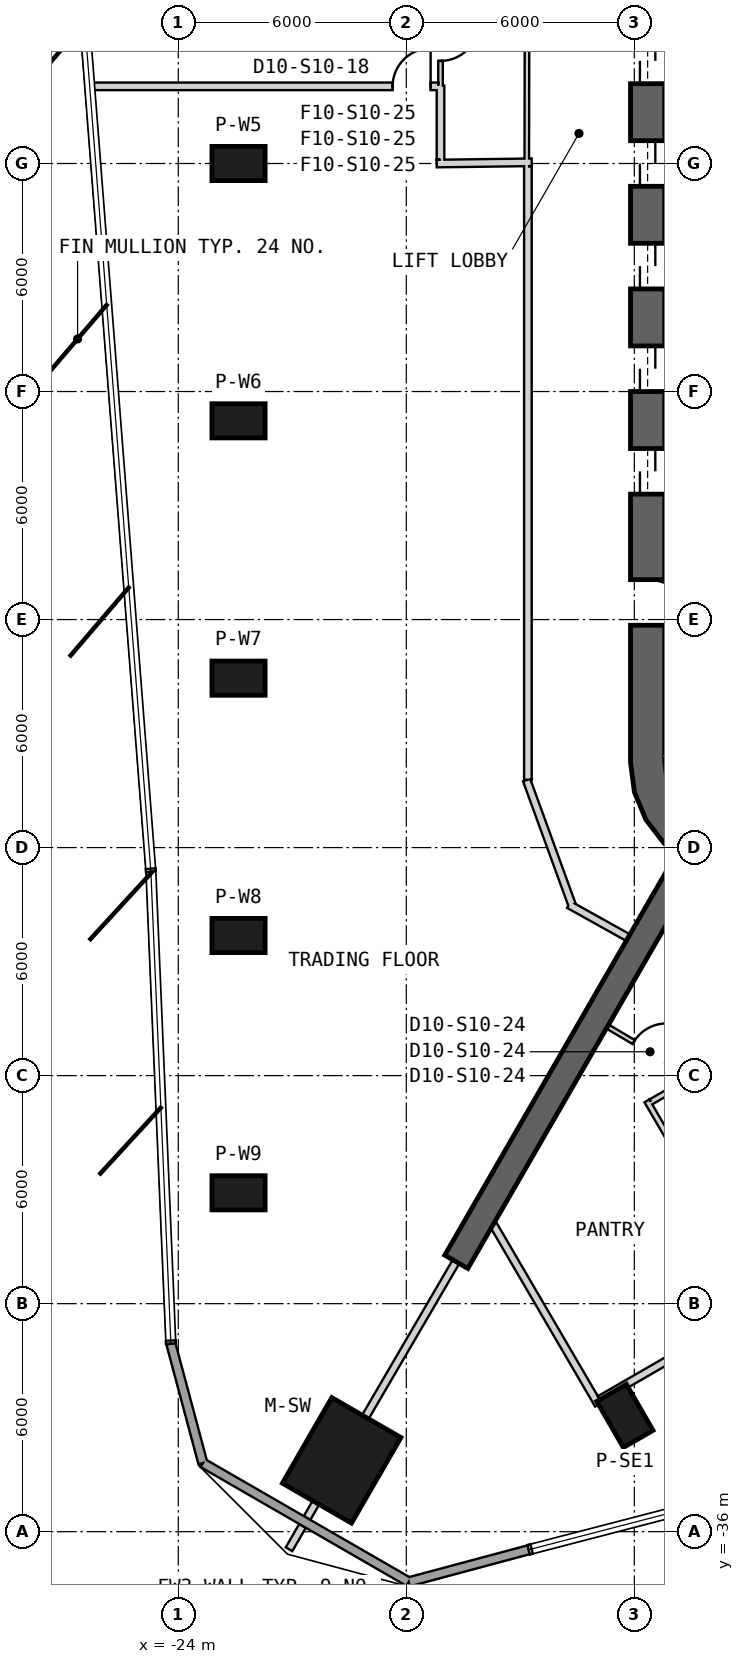
"""IFC4 building model, lengths in metres.
Left out: names, types, materials, properties, quantities, classifications, styles, units other than length and angle.
Written with IfcOpenShell. Run it as: python <this file> out.ifc"""

import sys

from ifc_helpers import new_model, si_unit, direction, frame, frame_2d, origin, origin_2d, place, context, subcontext, project, spatial, polyline, rectangle, outline, extrude, element, fill, save


model = new_model("IFC4")
c1 = context("Model", 3, precision=1e-05, world=origin(), true_north=direction((0.0, 1.0)))
c2 = subcontext(c1, "Body", "Model", "MODEL_VIEW")
j1 = project(units=[si_unit("LENGTHUNIT", "METRE"), si_unit("PLANEANGLEUNIT", "RADIAN")], contexts=[c1])
p1 = place(None, origin())
s1 = spatial("IfcSite", under=j1, at=p1, CompositionType="ELEMENT")
p2 = place(p1, origin())
s2 = spatial("IfcBuilding", under=s1, at=p2, CompositionType="ELEMENT")
p3 = place(p2, frame((0.0, 0.0, 181.2)))
s3 = spatial("IfcBuildingStorey", under=s2, at=p3, CompositionType="ELEMENT", Elevation=181.2)
p4 = place(p3, frame((-19.701, -34.124, 0.0), z_axis=(0.0, 0.0, 1.0), x_axis=(-0.5, -0.866025403784, 0.0)))
e1 = element("IfcColumn", 1, at=p4, inside=s3, PredefinedType="COLUMN", context=c2, shape_type="SweptSolid", body=[
    extrude(rectangle(XDim=2.6, YDim=2.1, at=origin_2d()), origin(), (0.0, 0.0, 1.0), 4.0),
])
for number, where, z_axis, x_axis in (
    (2, (-22.415, 0.0, 0.0), (0.0, 0.0, 1.0), (-1.0, 0.0, 0.0)),
    (3, (-22.415, -6.771, 0.0), (0.0, 0.0, 1.0), (-1.0, 0.0, 0.0)),
    (4, (-22.415, -13.542, 0.0), (0.0, 0.0, 1.0), (-1.0, 0.0, 0.0)),
    (5, (-22.415, -20.313, 0.0), (0.0, 0.0, 1.0), (-1.0, 0.0, 0.0)),
    (6, (-22.415, -27.084, 0.0), (0.0, 0.0, 1.0), (-1.0, 0.0, 0.0)),
    (7, (-12.248, -32.954, 0.0), (0.0, 0.0, 1.0), (0.5, -0.866, 0.0)),
):
    element("IfcColumn", number, at=place(p3, frame(where, z_axis=z_axis, x_axis=x_axis)), inside=s3, PredefinedType="COLUMN", context=c2, shape_type="SweptSolid", body=[
        extrude(rectangle(XDim=1.4, YDim=0.9, at=origin_2d()), origin(), (0.0, 0.0, 1.0), 4.0),
    ])
p5 = place(p3, frame((-11.65, 15.762, 0.0), z_axis=(0.0, 0.0, 1.0), x_axis=(0.0, -1.0, 0.0)))
e8 = element("IfcWall", 8, at=p5, inside=s3, PredefinedType="SHEAR", context=c2, shape_type="SweptSolid", body=[
    extrude(rectangle(XDim=31.523, YDim=0.9, at=frame_2d((15.762, 0.0))), origin(), (0.0, 0.0, 1.0), 4.0),
])
p6 = place(p5, frame((7.062, 0.0, 0.0)))
e9 = element("IfcOpeningElement", 9, at=p6, cuts=e8, PredefinedType="OPENING", context=c2, shape_type="SweptSolid", body=[
    extrude(rectangle(XDim=1.2, YDim=2.4, at=frame_2d((0.6, 1.2))), frame((0.0, 0.46, 0.0), z_axis=(0.0, -1.0, 0.0), x_axis=(1.0, 0.0, 0.0)), (0.0, 0.0, 1.0), 0.92),
])
p7 = place(p5, frame((9.762, 0.0, 0.0)))
e10 = element("IfcOpeningElement", 10, at=p7, cuts=e8, PredefinedType="OPENING", context=c2, shape_type="SweptSolid", body=[
    extrude(rectangle(XDim=1.2, YDim=2.4, at=frame_2d((0.6, 1.2))), frame((0.0, 0.46, 0.0), z_axis=(0.0, -1.0, 0.0), x_axis=(1.0, 0.0, 0.0)), (0.0, 0.0, 1.0), 0.92),
])
p8 = place(p5, frame((12.462, 0.0, 0.0)))
e11 = element("IfcOpeningElement", 11, at=p8, cuts=e8, PredefinedType="OPENING", context=c2, shape_type="SweptSolid", body=[
    extrude(rectangle(XDim=1.2, YDim=2.4, at=frame_2d((0.6, 1.2))), frame((0.0, 0.46, 0.0), z_axis=(0.0, -1.0, 0.0), x_axis=(1.0, 0.0, 0.0)), (0.0, 0.0, 1.0), 0.92),
])
p9 = place(p5, frame((15.162, 0.0, 0.0)))
e12 = element("IfcOpeningElement", 12, at=p9, cuts=e8, PredefinedType="OPENING", context=c2, shape_type="SweptSolid", body=[
    extrude(rectangle(XDim=1.2, YDim=2.4, at=frame_2d((0.6, 1.2))), frame((0.0, 0.46, 0.0), z_axis=(0.0, -1.0, 0.0), x_axis=(1.0, 0.0, 0.0)), (0.0, 0.0, 1.0), 0.92),
])
p10 = place(p5, frame((17.862, 0.0, 0.0)))
e13 = element("IfcOpeningElement", 13, at=p10, cuts=e8, PredefinedType="OPENING", context=c2, shape_type="SweptSolid", body=[
    extrude(rectangle(XDim=1.2, YDim=2.4, at=frame_2d((0.6, 1.2))), frame((0.0, 0.46, 0.0), z_axis=(0.0, -1.0, 0.0), x_axis=(1.0, 0.0, 0.0)), (0.0, 0.0, 1.0), 0.92),
])
p11 = place(p5, frame((20.562, 0.0, 0.0)))
e14 = element("IfcOpeningElement", 14, at=p11, cuts=e8, PredefinedType="OPENING", context=c2, shape_type="SweptSolid", body=[
    extrude(rectangle(XDim=1.2, YDim=2.4, at=frame_2d((0.6, 1.2))), frame((0.0, 0.46, 0.0), z_axis=(0.0, -1.0, 0.0), x_axis=(1.0, 0.0, 0.0)), (0.0, 0.0, 1.0), 0.92),
])
p12 = place(p5, frame((23.262, 0.0, 0.0)))
e15 = element("IfcOpeningElement", 15, at=p12, cuts=e8, PredefinedType="OPENING", context=c2, shape_type="SweptSolid", body=[
    extrude(rectangle(XDim=1.2, YDim=2.4, at=frame_2d((0.6, 1.2))), frame((0.0, 0.46, 0.0), z_axis=(0.0, -1.0, 0.0), x_axis=(1.0, 0.0, 0.0)), (0.0, 0.0, 1.0), 0.92),
])
p13 = place(p5, frame((3.612, 0.0, 0.0)))
e16 = element("IfcOpeningElement", 16, at=p13, cuts=e8, PredefinedType="OPENING", context=c2, shape_type="SweptSolid", body=[
    extrude(rectangle(XDim=1.2, YDim=2.4, at=frame_2d((0.6, 1.2))), frame((0.0, 0.46, 0.0), z_axis=(0.0, -1.0, 0.0), x_axis=(1.0, 0.0, 0.0)), (0.0, 0.0, 1.0), 0.92),
])
p14 = place(p5, frame((26.712, 0.0, 0.0)))
e17 = element("IfcOpeningElement", 17, at=p14, cuts=e8, PredefinedType="OPENING", context=c2, shape_type="SweptSolid", body=[
    extrude(rectangle(XDim=1.2, YDim=2.4, at=frame_2d((0.6, 1.2))), frame((0.0, 0.46, 0.0), z_axis=(0.0, -1.0, 0.0), x_axis=(1.0, 0.0, 0.0)), (0.0, 0.0, 1.0), 0.92),
])
p15 = place(p3, origin())
e18 = element("IfcWall", 18, at=p15, inside=s3, PredefinedType="SHEAR", context=c2, shape_type="SweptSolid", body=[
    extrude(outline(polyline([(-12.1, -15.762), (-11.998, -16.538), (-11.698, -17.262), (-11.221, -17.883), (-10.6, -18.36), (-9.876, -18.659), (-9.1, -18.762), (-8.323, -18.659), (-7.6, -18.36), (-8.05, -17.58), (-8.556, -17.79), (-9.1, -17.862), (-9.644, -17.79), (-10.15, -17.58), (-10.585, -17.247), (-10.919, -16.812), (-11.128, -16.305), (-11.2, -15.762), (-12.1, -15.762)])), origin(), (0.0, 0.0, 1.0), 4.0),
])
p16 = place(p3, frame((-10.575, -18.316, 0.0), z_axis=(0.0, 0.0, 1.0), x_axis=(-0.500002625756, -0.866023887798, 0.0)))
e19 = element("IfcWall", 19, at=p16, inside=s3, PredefinedType="SHEAR", context=c2, shape_type="SweptSolid", body=[
    extrude(rectangle(XDim=12.22, YDim=0.7, at=frame_2d((6.11, 0.0))), origin(), (0.0, 0.0, 1.0), 4.0),
])
p17 = place(p3, frame((-24.195, -31.051, 0.0), z_axis=(0.0, 0.0, 1.0), x_axis=(0.258806058597, -0.965929305919, 0.0)))
e20 = element("IfcWall", 20, at=p17, inside=s3, PredefinedType="SOLIDWALL", context=c2, shape_type="SweptSolid", body=[
    extrude(rectangle(XDim=3.255, YDim=0.24, at=frame_2d((1.628, 0.0))), origin(), (0.0, 0.0, 1.0), 3.7),
])
p18 = place(p3, frame((-23.353, -34.195, 0.0), z_axis=(0.0, 0.0, 1.0), x_axis=(0.866019130722, -0.500010865105, 0.0)))
e21 = element("IfcWall", 21, at=p18, inside=s3, PredefinedType="SOLIDWALL", context=c2, shape_type="SweptSolid", body=[
    extrude(rectangle(XDim=6.253, YDim=0.24, at=frame_2d((3.126, 0.0))), origin(), (0.0, 0.0, 1.0), 3.7),
])
p19 = place(p3, frame((-17.938, -37.322, 0.0), z_axis=(0.0, 0.0, 1.0), x_axis=(0.965924385118, 0.258824423565, 0.0)))
e22 = element("IfcWall", 22, at=p19, inside=s3, PredefinedType="SOLIDWALL", context=c2, shape_type="SweptSolid", body=[
    extrude(rectangle(XDim=3.269, YDim=0.24, at=frame_2d((1.635, 0.0))), origin(), (0.0, 0.0, 1.0), 3.7),
])
p20 = place(p3, frame((-11.282, -15.541, -0.3), z_axis=(0.0, 0.0, 1.0), x_axis=(0.866000483506, -0.500043160704, 0.0)))
e23 = element("IfcWall", 23, at=p20, inside=s3, PredefinedType="SHEAR", context=c2, shape_type="SweptSolid", body=[
    extrude(rectangle(XDim=3.8, YDim=0.2, at=frame_2d((1.9, 0.0))), origin(), (0.0, 0.0, 1.0), 4.0),
])
p21 = place(p3, frame((-7.196, -8.663, -0.3), z_axis=(0.0, 0.0, 1.0), x_axis=(-0.499997992926, -0.866026562566, 0.0)))
e24 = element("IfcWall", 24, at=p21, inside=s3, PredefinedType="SHEAR", context=c2, shape_type="SweptSolid", body=[
    extrude(rectangle(XDim=7.9, YDim=0.2, at=frame_2d((3.95, 0.0))), origin(), (0.0, 0.0, 1.0), 4.0),
])
p22 = place(p3, frame((-14.8, 16.257, 0.0), z_axis=(0.0, 0.0, 1.0), x_axis=(-0.001847148781, -0.999998294019, 0.0)))
e25 = element("IfcWall", 25, at=p22, inside=s3, PredefinedType="PARTITIONING", context=c2, shape_type="SweptSolid", body=[
    extrude(rectangle(XDim=16.257, YDim=0.12, at=frame_2d((8.128, 0.0))), origin(), (0.0, 0.0, 1.0), 2.88),
])
p23 = place(p22, frame((7.629, 0.0, 0.0)))
e26 = element("IfcOpeningElement", 26, at=p23, cuts=e25, PredefinedType="OPENING", context=c2, shape_type="SweptSolid", body=[
    extrude(rectangle(XDim=1.0, YDim=2.1, at=frame_2d((0.5, 1.05))), frame((0.0, 0.07, 0.0), z_axis=(0.0, -1.0, 0.0), x_axis=(1.0, 0.0, 0.0)), (0.0, 0.0, 1.0), 0.14),
])
p24 = place(p3, frame((-17.1, 4.35, 0.0), z_axis=(0.0, 0.0, 1.0), x_axis=(0.0, -1.0, 0.0)))
e27 = element("IfcWall", 27, at=p24, inside=s3, PredefinedType="PARTITIONING", context=c2, shape_type="SweptSolid", body=[
    extrude(rectangle(XDim=2.3, YDim=0.12, at=frame_2d((1.15, 0.0))), origin(), (0.0, 0.0, 1.0), 3.7),
])
p25 = place(p24, frame((0.65, 0.0, 0.0)))
e28 = element("IfcOpeningElement", 28, at=p25, cuts=e27, PredefinedType="OPENING", context=c2, shape_type="SweptSolid", body=[
    extrude(rectangle(XDim=1.0, YDim=2.1, at=frame_2d((0.5, 1.05))), frame((0.0, 0.07, 0.0), z_axis=(0.0, -1.0, 0.0), x_axis=(1.0, 0.0, 0.0)), (0.0, 0.0, 1.0), 0.14),
])
p26 = place(p3, frame((-17.2, -0.001, 0.0), z_axis=(0.0, 0.0, 1.0), x_axis=(0.999915662945, 0.012987185857, 0.0)))
e29 = element("IfcWall", 29, at=p26, inside=s3, PredefinedType="PARTITIONING", context=c2, shape_type="SweptSolid", body=[
    extrude(rectangle(XDim=2.5, YDim=0.2, at=frame_2d((1.25, 0.0))), origin(), (0.0, 0.0, 1.0), 3.07),
])
p27 = place(p3, frame((-17.1, 2.05, 0.0), z_axis=(0.0, 0.0, 1.0), x_axis=(0.0, -1.0, 0.0)))
e30 = element("IfcWall", 30, at=p27, inside=s3, PredefinedType="PARTITIONING", context=c2, shape_type="SweptSolid", body=[
    extrude(rectangle(XDim=1.95, YDim=0.2, at=frame_2d((0.975, 0.0))), origin(), (0.0, 0.0, 1.0), 3.07),
])
p28 = place(p3, frame((-13.722, -19.499, 0.0), z_axis=(0.0, 0.0, 1.0), x_axis=(0.873381780332, -0.487036205824, 0.0)))
e31 = element("IfcWall", 31, at=p28, inside=s3, PredefinedType="PARTITIONING", context=c2, shape_type="SweptSolid", body=[
    extrude(rectangle(XDim=1.785, YDim=0.2, at=frame_2d((0.892, 0.0))), origin(), (0.0, 0.0, 1.0), 3.7),
])
p29 = place(p3, frame((-14.834, -16.223, 0.0), z_axis=(0.0, 0.0, 1.0), x_axis=(0.342017717312, -0.939693503779, 0.0)))
e32 = element("IfcWall", 32, at=p29, inside=s3, PredefinedType="PARTITIONING", context=c2, shape_type="SweptSolid", body=[
    extrude(rectangle(XDim=3.497, YDim=0.2, at=frame_2d((1.749, 0.0))), origin(), (0.0, 0.0, 1.0), 2.78),
])
p30 = place(p3, frame((-14.8, -0.07, 0.0), z_axis=(0.0, 0.0, 1.0), x_axis=(0.0, -1.0, 0.0)))
e33 = element("IfcWall", 33, at=p30, inside=s3, PredefinedType="PARTITIONING", context=c2, shape_type="SweptSolid", body=[
    extrude(rectangle(XDim=16.147, YDim=0.2, at=frame_2d((8.073, 0.0))), origin(), (0.0, 0.0, 1.0), 2.88),
])
p31 = place(p3, frame((-12.707, -22.709, 0.0), z_axis=(0.0, 0.0, 1.0), x_axis=(0.860742216303, -0.509041095663, 0.0)))
e34 = element("IfcWall", 34, at=p31, inside=s3, PredefinedType="PARTITIONING", context=c2, shape_type="SweptSolid", body=[
    extrude(rectangle(XDim=2.506, YDim=0.12, at=frame_2d((1.253, 0.0))), origin(), (0.0, 0.0, 1.0), 3.7),
])
p32 = place(p31, frame((0.803, 0.0, 0.0)))
e35 = element("IfcOpeningElement", 35, at=p32, cuts=e34, PredefinedType="OPENING", context=c2, shape_type="SweptSolid", body=[
    extrude(rectangle(XDim=1.0, YDim=2.1, at=frame_2d((0.5, 1.05))), frame((0.0, 0.07, 0.0), z_axis=(0.0, -1.0, 0.0), x_axis=(1.0, 0.0, 0.0)), (0.0, 0.0, 1.0), 0.14),
])
p33 = place(p3, frame((-26.332, 2.03, 0.0), z_axis=(0.0, 0.0, 1.0), x_axis=(0.999999999646, 2.6619107e-05, 0.0)))
e36 = element("IfcWall", 36, at=p33, inside=s3, PredefinedType="PARTITIONING", context=c2, shape_type="SweptSolid", body=[
    extrude(rectangle(XDim=9.172, YDim=0.2, at=frame_2d((4.586, 0.0))), origin(), (0.0, 0.0, 1.0), 3.7),
])
p34 = place(p33, frame((7.972, 0.0, 0.0)))
e37 = element("IfcOpeningElement", 37, at=p34, cuts=e36, PredefinedType="OPENING", context=c2, shape_type="SweptSolid", body=[
    extrude(rectangle(XDim=1.0, YDim=2.1, at=frame_2d((0.5, 1.05))), frame((0.0, 0.11, 0.0), z_axis=(0.0, -1.0, 0.0), x_axis=(1.0, 0.0, 0.0)), (0.0, 0.0, 1.0), 0.22),
])
p35 = place(p3, frame((-21.086, -36.462, 0.0), z_axis=(0.0, 0.0, 1.0), x_axis=(0.499801860585, 0.866139769411, 0.0)))
e38 = element("IfcWall", 38, at=p35, inside=s3, PredefinedType="PARTITIONING", context=c2, shape_type="SweptSolid", body=[
    extrude(rectangle(XDim=0.71, YDim=0.2, at=frame_2d((0.355, 0.0))), origin(), (0.0, 0.0, 1.0), 3.7),
])
p36 = place(p3, frame((-20.611, -35.64, 0.0), z_axis=(0.0, 0.0, 1.0), x_axis=(0.499842898591, 0.866116087328, 0.0)))
e39 = element("IfcWall", 39, at=p36, inside=s3, PredefinedType="PARTITIONING", context=c2, shape_type="SweptSolid", body=[
    extrude(rectangle(XDim=0.468, YDim=0.2, at=frame_2d((0.234, 0.0))), origin(), (0.0, 0.0, 1.0), 3.7),
])
p37 = place(p3, frame((-19.077, -32.983, 0.0), z_axis=(0.0, 0.0, 1.0), x_axis=(0.504095526605, 0.863647902827, 0.0)))
e40 = element("IfcWall", 40, at=p37, inside=s3, PredefinedType="PARTITIONING", context=c2, shape_type="SweptSolid", body=[
    extrude(rectangle(XDim=4.733, YDim=0.2, at=frame_2d((2.366, 0.0))), origin(), (0.0, 0.0, 1.0), 3.27),
])
p38 = place(p3, frame((-8.543, -30.001, 0.0), z_axis=(0.0, 0.0, 1.0), x_axis=(-0.866017018378, -0.500014523669, 0.0)))
e41 = element("IfcWall", 41, at=p38, inside=s3, PredefinedType="PARTITIONING", context=c2, shape_type="SweptSolid", body=[
    extrude(rectangle(XDim=5.041, YDim=0.2, at=frame_2d((2.521, 0.0))), origin(), (0.0, 0.0, 1.0), 2.78),
])
p39 = place(p3, frame((-15.714, -27.918, 0.0), z_axis=(0.0, 0.0, 1.0), x_axis=(0.504506882404, -0.863407670574, 0.0)))
e42 = element("IfcWall", 42, at=p39, inside=s3, PredefinedType="PARTITIONING", context=c2, shape_type="SweptSolid", body=[
    extrude(rectangle(XDim=5.49, YDim=0.2, at=frame_2d((2.745, 0.0))), origin(), (0.0, 0.0, 1.0), 3.7),
])
p40 = place(p3, frame((-8.588, -29.94, 0.0), z_axis=(0.0, 0.0, 1.0), x_axis=(-0.504258537923, 0.863552735467, 0.0)))
e43 = element("IfcWall", 43, at=p40, inside=s3, PredefinedType="PLUMBINGWALL", context=c2, shape_type="SweptSolid", body=[
    extrude(rectangle(XDim=6.11, YDim=0.15, at=frame_2d((3.055, 0.0))), origin(), (0.0, 0.0, 1.0), 2.78),
])
p41 = place(p3, frame((-10.331, -23.984, 0.0), z_axis=(0.0, 0.0, 1.0), x_axis=(-0.867587682712, -0.49728423744, 0.0)))
e44 = element("IfcWall", 44, at=p41, inside=s3, PredefinedType="PLUMBINGWALL", context=c2, shape_type="SweptSolid", body=[
    extrude(rectangle(XDim=1.423, YDim=0.15, at=frame_2d((0.711, 0.0))), origin(), (0.0, 0.0, 1.0), 3.7),
])
p42 = place(p25, origin())
e45 = element("IfcDoor", 45, at=p42, inside=s3, OperationType="SINGLE_SWING_RIGHT", PredefinedType="NOTDEFINED", context=c2, shape_type="SweptSolid", body=[
    extrude(rectangle(XDim=1.0, YDim=2.1, at=frame_2d((0.5, 1.05))), frame((0.0, 0.025, 0.0), z_axis=(0.0, -1.0, 0.0), x_axis=(1.0, 0.0, 0.0)), (0.0, 0.0, 1.0), 0.05),
])
fill(e28, e45)
p43 = place(p32, origin())
e46 = element("IfcDoor", 46, at=p43, inside=s3, OperationType="SINGLE_SWING_RIGHT", PredefinedType="NOTDEFINED", context=c2, shape_type="SweptSolid", body=[
    extrude(rectangle(XDim=1.0, YDim=2.1, at=frame_2d((0.5, 1.05))), frame((0.0, 0.025, 0.0), z_axis=(0.0, -1.0, 0.0), x_axis=(1.0, 0.0, 0.0)), (0.0, 0.0, 1.0), 0.05),
])
fill(e35, e46)
p44 = place(p34, origin())
e47 = element("IfcDoor", 47, at=p44, inside=s3, OperationType="SINGLE_SWING_LEFT", PredefinedType="USERDEFINED", context=c2, shape_type="SweptSolid", body=[
    extrude(rectangle(XDim=1.0, YDim=2.1, at=frame_2d((0.5, 1.05))), frame((0.0, 0.025, 0.0), z_axis=(0.0, -1.0, 0.0), x_axis=(1.0, 0.0, 0.0)), (0.0, 0.0, 1.0), 0.05),
])
fill(e37, e47)
p45 = place(p8, origin())
e48 = element("IfcDoor", 48, at=p45, inside=s3, OperationType="SLIDING_TO_LEFT", PredefinedType="USERDEFINED", context=c2, shape_type="SweptSolid", body=[
    extrude(rectangle(XDim=1.2, YDim=2.4, at=frame_2d((0.6, 1.2))), frame((0.0, 0.025, 0.0), z_axis=(0.0, -1.0, 0.0), x_axis=(1.0, 0.0, 0.0)), (0.0, 0.0, 1.0), 0.05),
])
fill(e11, e48)
p46 = place(p9, origin())
e49 = element("IfcDoor", 49, at=p46, inside=s3, OperationType="SLIDING_TO_LEFT", PredefinedType="USERDEFINED", context=c2, shape_type="SweptSolid", body=[
    extrude(rectangle(XDim=1.2, YDim=2.4, at=frame_2d((0.6, 1.2))), frame((0.0, 0.025, 0.0), z_axis=(0.0, -1.0, 0.0), x_axis=(1.0, 0.0, 0.0)), (0.0, 0.0, 1.0), 0.05),
])
fill(e12, e49)
p47 = place(p10, origin())
e50 = element("IfcDoor", 50, at=p47, inside=s3, OperationType="SLIDING_TO_LEFT", PredefinedType="USERDEFINED", context=c2, shape_type="SweptSolid", body=[
    extrude(rectangle(XDim=1.2, YDim=2.4, at=frame_2d((0.6, 1.2))), frame((0.0, 0.025, 0.0), z_axis=(0.0, -1.0, 0.0), x_axis=(1.0, 0.0, 0.0)), (0.0, 0.0, 1.0), 0.05),
])
fill(e13, e50)
p48 = place(p11, origin())
e51 = element("IfcDoor", 51, at=p48, inside=s3, OperationType="SLIDING_TO_LEFT", PredefinedType="USERDEFINED", context=c2, shape_type="SweptSolid", body=[
    extrude(rectangle(XDim=1.2, YDim=2.4, at=frame_2d((0.6, 1.2))), frame((0.0, 0.025, 0.0), z_axis=(0.0, -1.0, 0.0), x_axis=(1.0, 0.0, 0.0)), (0.0, 0.0, 1.0), 0.05),
])
fill(e14, e51)
p49 = place(p12, origin())
e52 = element("IfcDoor", 52, at=p49, inside=s3, OperationType="SLIDING_TO_LEFT", PredefinedType="USERDEFINED", context=c2, shape_type="SweptSolid", body=[
    extrude(rectangle(XDim=1.2, YDim=2.4, at=frame_2d((0.6, 1.2))), frame((0.0, 0.025, 0.0), z_axis=(0.0, -1.0, 0.0), x_axis=(1.0, 0.0, 0.0)), (0.0, 0.0, 1.0), 0.05),
])
fill(e15, e52)
p50 = place(p14, origin())
e53 = element("IfcDoor", 53, at=p50, inside=s3, OperationType="SINGLE_SWING_LEFT", PredefinedType="USERDEFINED", context=c2, shape_type="SweptSolid", body=[
    extrude(rectangle(XDim=1.2, YDim=2.4, at=frame_2d((0.6, 1.2))), frame((0.0, 0.025, 0.0), z_axis=(0.0, -1.0, 0.0), x_axis=(1.0, 0.0, 0.0)), (0.0, 0.0, 1.0), 0.05),
])
fill(e17, e53)
save(model, sys.argv[1])
